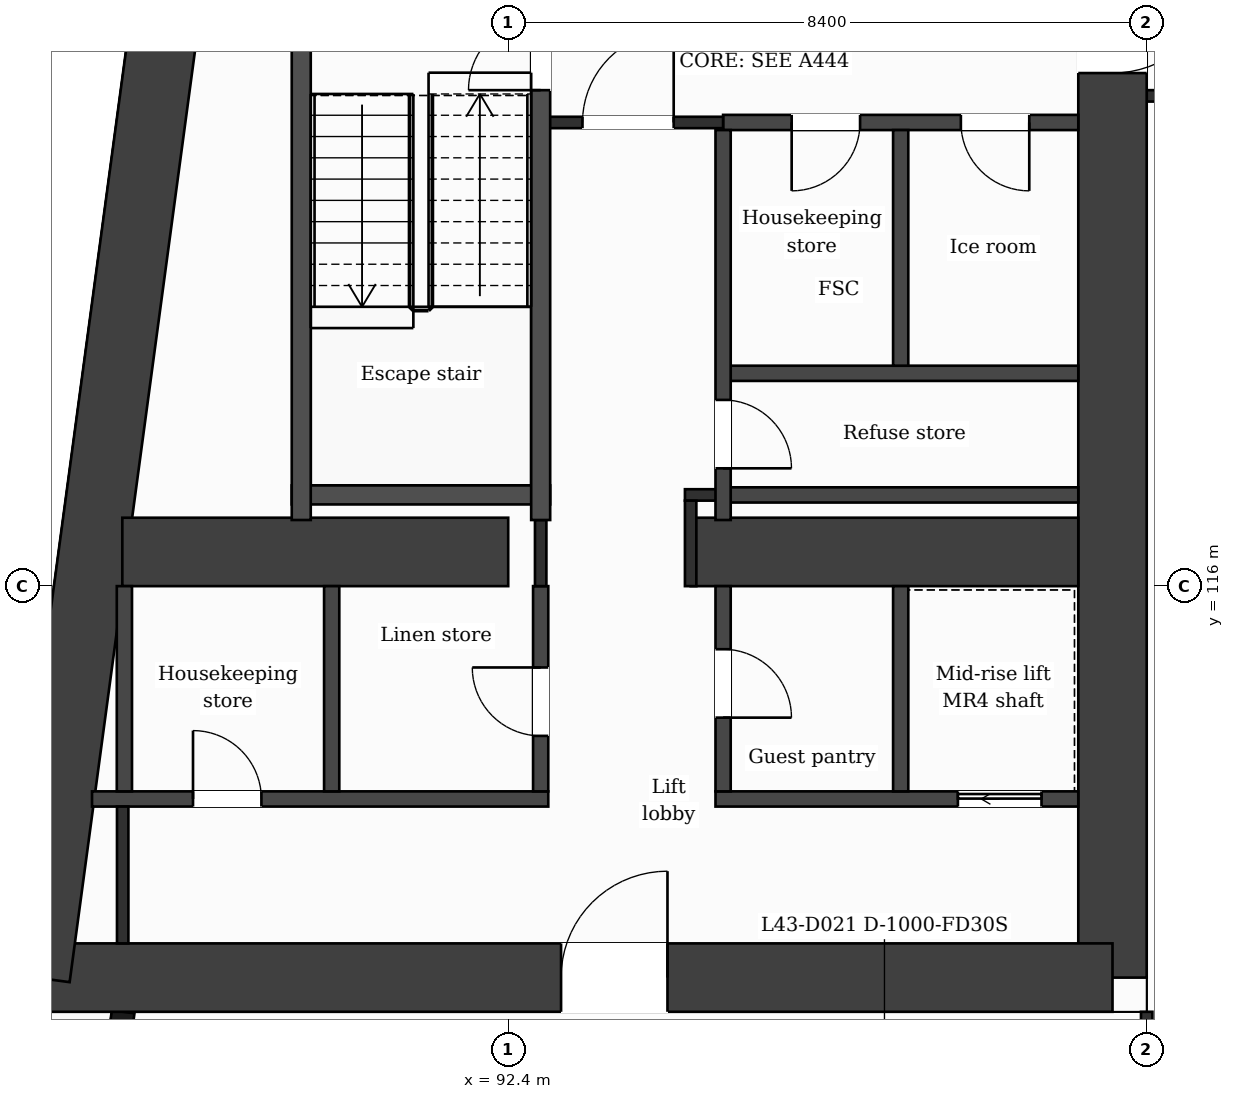
"""IFC4 building model, lengths in metres.
Left out: names, types, materials, properties, quantities, classifications, styles, units other than length and angle.
Written with IfcOpenShell. Run it as: python <this file> out.ifc"""

import sys

from ifc_helpers import new_model, si_unit, direction, frame, frame_2d, origin, place, context, subcontext, project, spatial, rectangle, extrude, element, fill, save


model = new_model("IFC4")
c1 = context("Model", 3, precision=1e-05, world=origin(), true_north=direction((0.0, 1.0)))
c2 = subcontext(c1, "Body", "Model", "MODEL_VIEW")
j1 = project(units=[si_unit("LENGTHUNIT", "METRE"), si_unit("PLANEANGLEUNIT", "RADIAN")], contexts=[c1])
p1 = place(None, origin())
s1 = spatial("IfcSite", under=j1, at=p1, CompositionType="ELEMENT")
p2 = place(p1, origin())
s2 = spatial("IfcBuilding", under=s1, at=p2, CompositionType="ELEMENT")
p3 = place(p2, frame((0.0, 0.0, 181.1)))
s3 = spatial("IfcBuildingStorey", under=s2, at=p3, CompositionType="ELEMENT", Elevation=181.1)
p4 = place(p3, frame((100.35, 131.95, 0.0), z_axis=(0.0, 0.0, 1.0), x_axis=(0.0, -1.0, 0.0)))
e1 = element("IfcWall", 1, at=p4, inside=s3, PredefinedType="SHEAR", context=c2, shape_type="SweptSolid", body=[
    extrude(rectangle(XDim=21.1, YDim=0.9, at=frame_2d((10.55, 0.0))), origin(), (0.0, 0.0, 1.0), 3.7),
])
p5 = place(p4, frame((7.8, 0.0, 0.0)))
e2 = element("IfcOpeningElement", 2, at=p5, cuts=e1, PredefinedType="OPENING", context=c2, shape_type="SweptSolid", body=[
    extrude(rectangle(XDim=1.4, YDim=2.1, at=frame_2d((0.7, 1.05))), frame((0.0, 0.46, 0.0), z_axis=(0.0, -1.0, 0.0), x_axis=(1.0, 0.0, 0.0)), (0.0, 0.0, 1.0), 0.92),
])
p6 = place(p3, frame((100.35, 110.85, 0.0), z_axis=(0.0, 0.0, 1.0), x_axis=(-1.0, 0.0, 0.0)))
e3 = element("IfcWall", 3, at=p6, inside=s3, PredefinedType="SHEAR", context=c2, shape_type="SweptSolid", body=[
    extrude(rectangle(XDim=14.166, YDim=0.9, at=frame_2d((7.083, 0.0))), origin(), (0.0, 0.0, 1.0), 3.7),
])
p7 = place(p6, frame((5.855, 0.0, 0.0)))
e4 = element("IfcOpeningElement", 4, at=p7, cuts=e3, PredefinedType="OPENING", context=c2, shape_type="SweptSolid", body=[
    extrude(rectangle(XDim=1.4, YDim=2.1, at=frame_2d((0.7, 1.05))), frame((0.0, 0.46, 0.0), z_axis=(0.0, -1.0, 0.0), x_axis=(1.0, 0.0, 0.0)), (0.0, 0.0, 1.0), 0.92),
])
p8 = place(p3, frame((86.184, 110.85, 0.0), z_axis=(0.0, 0.0, 1.0), x_axis=(0.133410495943, 0.991060865725, 0.0)))
e5 = element("IfcWall", 5, at=p8, inside=s3, PredefinedType="SHEAR", context=c2, shape_type="SweptSolid", body=[
    extrude(rectangle(XDim=21.29, YDim=0.9, at=frame_2d((10.645, 0.0))), origin(), (0.0, 0.0, 1.0), 3.7),
])
p9 = place(p3, frame((87.323, 116.45, 0.0), z_axis=(0.0, 0.0, 1.0), x_axis=(1.0, 0.0, 0.0)))
e6 = element("IfcWall", 6, at=p9, inside=s3, PredefinedType="SHEAR", context=c2, shape_type="SweptSolid", body=[
    extrude(rectangle(XDim=5.077, YDim=0.9, at=frame_2d((2.539, 0.0))), origin(), (0.0, 0.0, 1.0), 3.7),
])
p10 = place(p3, frame((94.8, 116.45, 0.0), z_axis=(0.0, 0.0, 1.0), x_axis=(1.0, 0.0, 0.0)))
e7 = element("IfcWall", 7, at=p10, inside=s3, PredefinedType="SHEAR", context=c2, shape_type="SweptSolid", body=[
    extrude(rectangle(XDim=5.1, YDim=0.9, at=frame_2d((2.55, 0.0))), origin(), (0.0, 0.0, 1.0), 3.7),
])
p11 = place(p3, frame((87.334, 110.4, 0.0), z_axis=(0.0, 0.0, 1.0), x_axis=(-0.133437175554, -0.991057273915, 0.0)))
e8 = element("IfcWall", 8, at=p11, inside=s3, PredefinedType="SOLIDWALL", context=c2, shape_type="SweptSolid", body=[
    extrude(rectangle(XDim=6.781, YDim=0.3, at=frame_2d((3.39, 0.0))), origin(), (0.0, 0.0, 1.0), 3.38),
])
p12 = place(p11, frame((1.418, 0.0, 0.0)))
e9 = element("IfcOpeningElement", 9, at=p12, cuts=e8, PredefinedType="OPENING", context=c2, shape_type="SweptSolid", body=[
    extrude(rectangle(XDim=1.2, YDim=2.4, at=frame_2d((0.6, 1.2))), frame((0.0, 0.16, 0.0), z_axis=(0.0, -1.0, 0.0), x_axis=(1.0, 0.0, 0.0)), (0.0, 0.0, 1.0), 0.32),
])
p13 = place(p11, frame((4.758, 0.0, 0.9)))
e10 = element("IfcOpeningElement", 10, at=p13, cuts=e8, PredefinedType="OPENING", context=c2, shape_type="SweptSolid", body=[
    extrude(rectangle(XDim=1.2, YDim=2.1, at=frame_2d((0.6, 1.05))), frame((0.0, 0.16, 0.0), z_axis=(0.0, -1.0, 0.0), x_axis=(1.0, 0.0, 0.0)), (0.0, 0.0, 1.0), 0.32),
])
p14 = place(p3, frame((86.924, 113.2, 0.0), z_axis=(0.0, 0.0, 1.0), x_axis=(1.0, 0.0, 0.0)))
e11 = element("IfcWall", 11, at=p14, inside=s3, PredefinedType="PARTITIONING", context=c2, shape_type="SweptSolid", body=[
    extrude(rectangle(XDim=6.003, YDim=0.2, at=frame_2d((3.001, 0.0))), origin(), (0.0, 0.0, 1.0), 3.38),
])
p15 = place(p14, frame((1.329, 0.0, 0.0)))
e12 = element("IfcOpeningElement", 12, at=p15, cuts=e11, PredefinedType="OPENING", context=c2, shape_type="SweptSolid", body=[
    extrude(rectangle(XDim=0.9, YDim=2.1, at=frame_2d((0.45, 1.05))), frame((0.0, 0.11, 0.0), z_axis=(0.0, -1.0, 0.0), x_axis=(1.0, 0.0, 0.0)), (0.0, 0.0, 1.0), 0.22),
])
p16 = place(p3, frame((95.127, 113.2, 0.0), z_axis=(0.0, 0.0, 1.0), x_axis=(1.0, 0.0, 0.0)))
e13 = element("IfcWall", 13, at=p16, inside=s3, PredefinedType="PARTITIONING", context=c2, shape_type="SweptSolid", body=[
    extrude(rectangle(XDim=4.773, YDim=0.2, at=frame_2d((2.386, 0.0))), origin(), (0.0, 0.0, 1.0), 3.38),
])
p17 = place(p16, frame((3.189, 0.0, 0.0)))
e14 = element("IfcOpeningElement", 14, at=p17, cuts=e13, PredefinedType="OPENING", context=c2, shape_type="SweptSolid", body=[
    extrude(rectangle(XDim=1.1, YDim=2.1, at=frame_2d((0.55, 1.05))), frame((0.0, 0.11, 0.0), z_axis=(0.0, -1.0, 0.0), x_axis=(1.0, 0.0, 0.0)), (0.0, 0.0, 1.0), 0.22),
])
p18 = place(p3, frame((95.227, 117.2, 0.0), z_axis=(0.0, 0.0, 1.0), x_axis=(1.0, 0.0, 0.0)))
e15 = element("IfcWall", 15, at=p18, inside=s3, PredefinedType="PARTITIONING", context=c2, shape_type="SweptSolid", body=[
    extrude(rectangle(XDim=4.673, YDim=0.2, at=frame_2d((2.336, 0.0))), origin(), (0.0, 0.0, 1.0), 3.38),
])
p19 = place(p3, frame((94.725, 117.2, 0.0), z_axis=(0.0, 0.0, 1.0), x_axis=(1.0, 0.0, 0.0)))
e16 = element("IfcWall", 16, at=p19, inside=s3, PredefinedType="PARTITIONING", context=c2, shape_type="SweptSolid", body=[
    extrude(rectangle(XDim=0.502, YDim=0.15, at=frame_2d((0.251, 0.0))), origin(), (0.0, 0.0, 1.0), 3.38),
])
p20 = place(p3, frame((89.552, 117.2, 0.0), z_axis=(0.0, 0.0, 1.0), x_axis=(1.0, 0.0, 0.0)))
e17 = element("IfcWall", 17, at=p20, inside=s3, PredefinedType="PARTITIONING", context=c2, shape_type="SweptSolid", body=[
    extrude(rectangle(XDim=3.4, YDim=0.25, at=frame_2d((1.7, 0.0))), origin(), (0.0, 0.0, 1.0), 3.38),
])
p21 = place(p3, frame((95.227, 118.8, 0.0), z_axis=(0.0, 0.0, 1.0), x_axis=(1.0, 0.0, 0.0)))
e18 = element("IfcWall", 18, at=p21, inside=s3, PredefinedType="PARTITIONING", context=c2, shape_type="SweptSolid", body=[
    extrude(rectangle(XDim=4.673, YDim=0.2, at=frame_2d((2.336, 0.0))), origin(), (0.0, 0.0, 1.0), 3.38),
])
p22 = place(p3, frame((95.227, 122.1, 0.0), z_axis=(0.0, 0.0, 1.0), x_axis=(1.0, 0.0, 0.0)))
e19 = element("IfcWall", 19, at=p22, inside=s3, PredefinedType="PARTITIONING", context=c2, shape_type="SweptSolid", body=[
    extrude(rectangle(XDim=4.673, YDim=0.2, at=frame_2d((2.336, 0.0))), origin(), (0.0, 0.0, 1.0), 3.38),
])
p23 = place(p22, frame((0.902, 0.0, 0.0)))
e20 = element("IfcOpeningElement", 20, at=p23, cuts=e19, PredefinedType="OPENING", context=c2, shape_type="SweptSolid", body=[
    extrude(rectangle(XDim=0.9, YDim=2.1, at=frame_2d((0.45, 1.05))), frame((0.0, 0.11, 0.0), z_axis=(0.0, -1.0, 0.0), x_axis=(1.0, 0.0, 0.0)), (0.0, 0.0, 1.0), 0.22),
])
p24 = place(p22, frame((3.128, 0.0, 0.0)))
e21 = element("IfcOpeningElement", 21, at=p24, cuts=e19, PredefinedType="OPENING", context=c2, shape_type="SweptSolid", body=[
    extrude(rectangle(XDim=0.9, YDim=2.1, at=frame_2d((0.45, 1.05))), frame((0.0, 0.11, 0.0), z_axis=(0.0, -1.0, 0.0), x_axis=(1.0, 0.0, 0.0)), (0.0, 0.0, 1.0), 0.22),
])
p25 = place(p3, frame((92.827, 122.1, 0.0), z_axis=(0.0, 0.0, 1.0), x_axis=(1.0, 0.0, 0.0)))
e22 = element("IfcWall", 22, at=p25, inside=s3, PredefinedType="PARTITIONING", context=c2, shape_type="SweptSolid", body=[
    extrude(rectangle(XDim=2.4, YDim=0.15, at=frame_2d((1.2, 0.0))), origin(), (0.0, 0.0, 1.0), 3.38),
])
p26 = place(p25, frame((0.55, 0.0, 0.0)))
e23 = element("IfcOpeningElement", 23, at=p26, cuts=e22, PredefinedType="OPENING", context=c2, shape_type="SweptSolid", body=[
    extrude(rectangle(XDim=1.2, YDim=2.1, at=frame_2d((0.6, 1.05))), frame((0.0, 0.085, 0.0), z_axis=(0.0, -1.0, 0.0), x_axis=(1.0, 0.0, 0.0)), (0.0, 0.0, 1.0), 0.17),
])
p27 = place(p3, frame((100.8, 122.45, 0.0), z_axis=(0.0, 0.0, 1.0), x_axis=(1.0, 0.0, 0.0)))
e24 = element("IfcWall", 24, at=p27, inside=s3, PredefinedType="PARTITIONING", context=c2, shape_type="SweptSolid", body=[
    extrude(rectangle(XDim=25.2, YDim=0.15, at=frame_2d((12.6, 0.0))), origin(), (0.0, 0.0, 1.0), 3.38),
])
p28 = place(p3, frame((87.35, 113.3, 0.0), z_axis=(0.0, 0.0, 1.0), x_axis=(0.0, 1.0, 0.0)))
e25 = element("IfcWall", 25, at=p28, inside=s3, PredefinedType="PARTITIONING", context=c2, shape_type="SweptSolid", body=[
    extrude(rectangle(XDim=2.7, YDim=0.2, at=frame_2d((1.35, 0.0))), origin(), (0.0, 0.0, 1.0), 3.38),
])
p29 = place(p3, frame((87.328, 111.3, 0.0), z_axis=(0.0, 0.0, 1.0), x_axis=(0.0, 1.0, 0.0)))
e26 = element("IfcWall", 26, at=p29, inside=s3, PredefinedType="PARTITIONING", context=c2, shape_type="SweptSolid", body=[
    extrude(rectangle(XDim=1.8, YDim=0.15, at=frame_2d((0.9, 0.0))), origin(), (0.0, 0.0, 1.0), 3.38),
])
p30 = place(p3, frame((89.677, 116.87, 0.0), z_axis=(0.0, 0.0, 1.0), x_axis=(0.0, 1.0, 0.0)))
e27 = element("IfcWall", 27, at=p30, inside=s3, PredefinedType="PARTITIONING", context=c2, shape_type="SweptSolid", body=[
    extrude(rectangle(XDim=6.955, YDim=0.25, at=frame_2d((3.478, 0.0))), origin(), (0.0, 0.0, 1.0), 3.38),
])
p31 = place(p3, frame((90.077, 113.3, 0.0), z_axis=(0.0, 0.0, 1.0), x_axis=(0.0, 1.0, 0.0)))
e28 = element("IfcWall", 28, at=p31, inside=s3, PredefinedType="PARTITIONING", context=c2, shape_type="SweptSolid", body=[
    extrude(rectangle(XDim=2.7, YDim=0.2, at=frame_2d((1.35, 0.0))), origin(), (0.0, 0.0, 1.0), 3.38),
])
p32 = place(p3, frame((92.827, 113.3, 0.0), z_axis=(0.0, 0.0, 1.0), x_axis=(0.0, 1.0, 0.0)))
e29 = element("IfcWall", 29, at=p32, inside=s3, PredefinedType="PARTITIONING", context=c2, shape_type="SweptSolid", body=[
    extrude(rectangle(XDim=2.7, YDim=0.2, at=frame_2d((1.35, 0.0))), origin(), (0.0, 0.0, 1.0), 3.38),
])
p33 = place(p32, frame((0.73, 0.0, 0.0)))
e30 = element("IfcOpeningElement", 30, at=p33, cuts=e29, PredefinedType="OPENING", context=c2, shape_type="SweptSolid", body=[
    extrude(rectangle(XDim=0.9, YDim=2.1, at=frame_2d((0.45, 1.05))), frame((0.0, 0.11, 0.0), z_axis=(0.0, -1.0, 0.0), x_axis=(1.0, 0.0, 0.0)), (0.0, 0.0, 1.0), 0.22),
])
p34 = place(p3, frame((92.827, 116.0, 0.0), z_axis=(0.0, 0.0, 1.0), x_axis=(0.0, 1.0, 0.0)))
e31 = element("IfcWall", 31, at=p34, inside=s3, PredefinedType="PARTITIONING", context=c2, shape_type="SweptSolid", body=[
    extrude(rectangle(XDim=0.87, YDim=0.15, at=frame_2d((0.435, 0.0))), origin(), (0.0, 0.0, 1.0), 3.38),
])
p35 = place(p3, frame((92.827, 116.87, 0.0), z_axis=(0.0, 0.0, 1.0), x_axis=(0.0, 1.0, 0.0)))
e32 = element("IfcWall", 32, at=p35, inside=s3, PredefinedType="PARTITIONING", context=c2, shape_type="SweptSolid", body=[
    extrude(rectangle(XDim=6.955, YDim=0.25, at=frame_2d((3.478, 0.0))), origin(), (0.0, 0.0, 1.0), 3.38),
])
p36 = place(p35, frame((5.655, 0.0, 0.0)))
e33 = element("IfcOpeningElement", 33, at=p36, cuts=e32, PredefinedType="OPENING", context=c2, shape_type="SweptSolid", body=[
    extrude(rectangle(XDim=0.95, YDim=2.1, at=frame_2d((0.475, 1.05))), frame((0.0, 0.135, 0.0), z_axis=(0.0, -1.0, 0.0), x_axis=(1.0, 0.0, 0.0)), (0.0, 0.0, 1.0), 0.27),
])
p37 = place(p3, frame((94.8, 116.0, 0.0), z_axis=(0.0, 0.0, 1.0), x_axis=(0.0, 1.0, 0.0)))
e34 = element("IfcWall", 34, at=p37, inside=s3, PredefinedType="PARTITIONING", context=c2, shape_type="SweptSolid", body=[
    extrude(rectangle(XDim=1.125, YDim=0.15, at=frame_2d((0.562, 0.0))), origin(), (0.0, 0.0, 1.0), 3.38),
])
p38 = place(p3, frame((95.227, 113.3, 0.0), z_axis=(0.0, 0.0, 1.0), x_axis=(0.0, 1.0, 0.0)))
e35 = element("IfcWall", 35, at=p38, inside=s3, PredefinedType="PARTITIONING", context=c2, shape_type="SweptSolid", body=[
    extrude(rectangle(XDim=2.7, YDim=0.2, at=frame_2d((1.35, 0.0))), origin(), (0.0, 0.0, 1.0), 3.38),
])
p39 = place(p38, frame((0.97, 0.0, 0.0)))
e36 = element("IfcOpeningElement", 36, at=p39, cuts=e35, PredefinedType="OPENING", context=c2, shape_type="SweptSolid", body=[
    extrude(rectangle(XDim=0.9, YDim=2.1, at=frame_2d((0.45, 1.05))), frame((0.0, 0.11, 0.0), z_axis=(0.0, -1.0, 0.0), x_axis=(1.0, 0.0, 0.0)), (0.0, 0.0, 1.0), 0.22),
])
p40 = place(p3, frame((95.227, 116.87, 0.0), z_axis=(0.0, 0.0, 1.0), x_axis=(0.0, 1.0, 0.0)))
e37 = element("IfcWall", 37, at=p40, inside=s3, PredefinedType="PARTITIONING", context=c2, shape_type="SweptSolid", body=[
    extrude(rectangle(XDim=5.13, YDim=0.2, at=frame_2d((2.565, 0.0))), origin(), (0.0, 0.0, 1.0), 3.38),
])
p41 = place(p40, frame((0.68, 0.0, 0.0)))
e38 = element("IfcOpeningElement", 38, at=p41, cuts=e37, PredefinedType="OPENING", context=c2, shape_type="SweptSolid", body=[
    extrude(rectangle(XDim=0.9, YDim=2.1, at=frame_2d((0.45, 1.05))), frame((0.0, 0.11, 0.0), z_axis=(0.0, -1.0, 0.0), x_axis=(1.0, 0.0, 0.0)), (0.0, 0.0, 1.0), 0.22),
])
p42 = place(p3, frame((97.563, 113.3, 0.0), z_axis=(0.0, 0.0, 1.0), x_axis=(0.0, 1.0, 0.0)))
e39 = element("IfcWall", 39, at=p42, inside=s3, PredefinedType="PARTITIONING", context=c2, shape_type="SweptSolid", body=[
    extrude(rectangle(XDim=2.7, YDim=0.2, at=frame_2d((1.35, 0.0))), origin(), (0.0, 0.0, 1.0), 3.38),
])
p43 = place(p3, frame((97.563, 118.9, 0.0), z_axis=(0.0, 0.0, 1.0), x_axis=(0.0, 1.0, 0.0)))
e40 = element("IfcWall", 40, at=p43, inside=s3, PredefinedType="PARTITIONING", context=c2, shape_type="SweptSolid", body=[
    extrude(rectangle(XDim=3.1, YDim=0.2, at=frame_2d((1.55, 0.0))), origin(), (0.0, 0.0, 1.0), 3.38),
])
p44 = place(p3, frame((100.8, 109.075, 0.0), z_axis=(0.0, 0.0, 1.0), x_axis=(0.0, 1.0, 0.0)))
e41 = element("IfcWall", 41, at=p44, inside=s3, PredefinedType="PARTITIONING", context=c2, shape_type="SweptSolid", body=[
    extrude(rectangle(XDim=1.325, YDim=0.15, at=frame_2d((0.663, 0.0))), origin(), (0.0, 0.0, 1.0), 3.38),
])
p45 = place(p26, origin())
e42 = element("IfcDoor", 42, at=p45, inside=s3, OperationType="SINGLE_SWING_RIGHT", PredefinedType="DOOR", context=c2, shape_type="SweptSolid", body=[
    extrude(rectangle(XDim=1.2, YDim=2.1, at=frame_2d((0.6, 1.05))), frame((0.0, 0.025, 0.0), z_axis=(0.0, -1.0, 0.0), x_axis=(1.0, 0.0, 0.0)), (0.0, 0.0, 1.0), 0.05),
])
fill(e23, e42)
p46 = place(p23, origin())
e43 = element("IfcDoor", 43, at=p46, inside=s3, OperationType="SINGLE_SWING_LEFT", PredefinedType="DOOR", context=c2, shape_type="SweptSolid", body=[
    extrude(rectangle(XDim=0.9, YDim=2.1, at=frame_2d((0.45, 1.05))), frame((0.0, 0.025, 0.0), z_axis=(0.0, -1.0, 0.0), x_axis=(1.0, 0.0, 0.0)), (0.0, 0.0, 1.0), 0.05),
])
fill(e20, e43)
p47 = place(p24, origin())
e44 = element("IfcDoor", 44, at=p47, inside=s3, OperationType="SINGLE_SWING_RIGHT", PredefinedType="DOOR", context=c2, shape_type="SweptSolid", body=[
    extrude(rectangle(XDim=0.9, YDim=2.1, at=frame_2d((0.45, 1.05))), frame((0.0, 0.025, 0.0), z_axis=(0.0, -1.0, 0.0), x_axis=(1.0, 0.0, 0.0)), (0.0, 0.0, 1.0), 0.05),
])
fill(e21, e44)
p48 = place(p36, origin())
e45 = element("IfcDoor", 45, at=p48, inside=s3, OperationType="SINGLE_SWING_LEFT", PredefinedType="DOOR", context=c2, shape_type="SweptSolid", body=[
    extrude(rectangle(XDim=0.95, YDim=2.1, at=frame_2d((0.475, 1.05))), frame((0.0, 0.025, 0.0), z_axis=(0.0, -1.0, 0.0), x_axis=(1.0, 0.0, 0.0)), (0.0, 0.0, 1.0), 0.05),
])
fill(e33, e45)
p49 = place(p41, origin())
e46 = element("IfcDoor", 46, at=p49, inside=s3, OperationType="SINGLE_SWING_LEFT", PredefinedType="DOOR", context=c2, shape_type="SweptSolid", body=[
    extrude(rectangle(XDim=0.9, YDim=2.1, at=frame_2d((0.45, 1.05))), frame((0.0, 0.025, 0.0), z_axis=(0.0, -1.0, 0.0), x_axis=(1.0, 0.0, 0.0)), (0.0, 0.0, 1.0), 0.05),
])
fill(e38, e46)
p50 = place(p17, origin())
e47 = element("IfcDoor", 47, at=p50, inside=s3, OperationType="SLIDING_TO_LEFT", PredefinedType="DOOR", context=c2, shape_type="SweptSolid", body=[
    extrude(rectangle(XDim=1.1, YDim=2.1, at=frame_2d((0.55, 1.05))), frame((0.0, 0.025, 0.0), z_axis=(0.0, -1.0, 0.0), x_axis=(1.0, 0.0, 0.0)), (0.0, 0.0, 1.0), 0.05),
])
fill(e14, e47)
p51 = place(p15, origin())
e48 = element("IfcDoor", 48, at=p51, inside=s3, OperationType="SINGLE_SWING_LEFT", PredefinedType="DOOR", context=c2, shape_type="SweptSolid", body=[
    extrude(rectangle(XDim=0.9, YDim=2.1, at=frame_2d((0.45, 1.05))), frame((0.0, 0.025, 0.0), z_axis=(0.0, -1.0, 0.0), x_axis=(1.0, 0.0, 0.0)), (0.0, 0.0, 1.0), 0.05),
])
fill(e12, e48)
p52 = place(p33, origin())
e49 = element("IfcDoor", 49, at=p52, inside=s3, OperationType="SINGLE_SWING_RIGHT", PredefinedType="DOOR", context=c2, shape_type="SweptSolid", body=[
    extrude(rectangle(XDim=0.9, YDim=2.1, at=frame_2d((0.45, 1.05))), frame((0.0, 0.025, 0.0), z_axis=(0.0, -1.0, 0.0), x_axis=(1.0, 0.0, 0.0)), (0.0, 0.0, 1.0), 0.05),
])
fill(e30, e49)
p53 = place(p39, origin())
e50 = element("IfcDoor", 50, at=p53, inside=s3, OperationType="SINGLE_SWING_LEFT", PredefinedType="DOOR", context=c2, shape_type="SweptSolid", body=[
    extrude(rectangle(XDim=0.9, YDim=2.1, at=frame_2d((0.45, 1.05))), frame((0.0, 0.025, 0.0), z_axis=(0.0, -1.0, 0.0), x_axis=(1.0, 0.0, 0.0)), (0.0, 0.0, 1.0), 0.05),
])
fill(e36, e50)
p54 = place(p7, origin())
e51 = element("IfcDoor", 51, at=p54, inside=s3, OperationType="SINGLE_SWING_LEFT", PredefinedType="DOOR", context=c2, shape_type="SweptSolid", body=[
    extrude(rectangle(XDim=1.4, YDim=2.1, at=frame_2d((0.7, 1.05))), frame((0.0, 0.025, 0.0), z_axis=(0.0, -1.0, 0.0), x_axis=(1.0, 0.0, 0.0)), (0.0, 0.0, 1.0), 0.05),
])
fill(e4, e51)
p55 = place(p5, origin())
e52 = element("IfcDoor", 52, at=p55, inside=s3, OperationType="SINGLE_SWING_LEFT", PredefinedType="DOOR", context=c2, shape_type="SweptSolid", body=[
    extrude(rectangle(XDim=1.4, YDim=2.1, at=frame_2d((0.7, 1.05))), frame((0.0, 0.025, 0.0), z_axis=(0.0, -1.0, 0.0), x_axis=(1.0, 0.0, 0.0)), (0.0, 0.0, 1.0), 0.05),
])
fill(e2, e52)
save(model, sys.argv[1])
